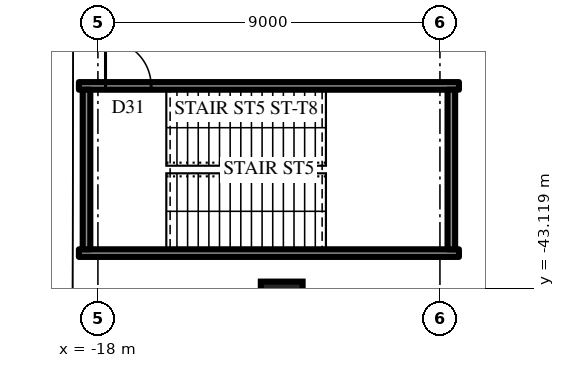
"""IFC4 building model, lengths in metres.
Left out: names, types, materials, properties, quantities, classifications, styles, units other than length and angle.
Written with IfcOpenShell. Run it as: python <this file> out.ifc"""

import sys

from ifc_helpers import new_model, si_unit, direction, frame, frame_2d, origin, origin_2d, place, context, subcontext, project, spatial, rectangle, extrude, element, fill, save


model = new_model("IFC4")
c1 = context("Model", 3, precision=1e-05, world=origin(), true_north=direction((0.0, 1.0)))
c2 = subcontext(c1, "Body", "Model", "MODEL_VIEW")
j1 = project(units=[si_unit("LENGTHUNIT", "METRE"), si_unit("PLANEANGLEUNIT", "RADIAN")], contexts=[c1])
p1 = place(None, origin())
s1 = spatial("IfcSite", under=j1, at=p1, CompositionType="ELEMENT")
p2 = place(p1, origin())
s2 = spatial("IfcBuilding", under=s1, at=p2, CompositionType="ELEMENT")
p3 = place(p2, frame((0.0, 0.0, 13.0)))
s3 = spatial("IfcBuildingStorey", under=s2, at=p3, CompositionType="ELEMENT", Elevation=13.0)
p4 = place(p3, frame((-18.5, -42.2, 0.0), z_axis=(0.0, 0.0, 1.0), x_axis=(1.0, 0.0, 0.0)))
e1 = element("IfcWall", 1, at=p4, inside=s3, PredefinedType="SHEAR", context=c2, shape_type="SweptSolid", body=[
    extrude(rectangle(XDim=10.0, YDim=0.2, at=frame_2d((5.0, 0.0))), origin(), (0.0, 0.0, 1.0), 5.5),
])
p5 = place(p3, frame((-8.5, -37.8, 0.0), z_axis=(0.0, 0.0, 1.0), x_axis=(-1.0, 0.0, 0.0)))
e2 = element("IfcWall", 2, at=p5, inside=s3, PredefinedType="SHEAR", context=c2, shape_type="SweptSolid", body=[
    extrude(rectangle(XDim=10.0, YDim=0.2, at=frame_2d((5.0, 0.0))), origin(), (0.0, 0.0, 1.0), 5.5),
])
p6 = place(p5, frame((8.1, 0.0, 0.0)))
e3 = element("IfcOpeningElement", 3, at=p6, cuts=e2, PredefinedType="OPENING", context=c2, shape_type="SweptSolid", body=[
    extrude(rectangle(XDim=1.2, YDim=2.2, at=frame_2d((0.6, 1.1))), frame((0.0, 0.11, 0.0), z_axis=(0.0, -1.0, 0.0), x_axis=(1.0, 0.0, 0.0)), (0.0, 0.0, 1.0), 0.22),
])
for number, where, z_axis, x_axis in (
    (4, (-18.3, -37.9, 0.0), (0.0, 0.0, 1.0), (0.0, -1.0, 0.0)),
    (5, (-8.7, -42.1, 0.0), (0.0, 0.0, 1.0), (0.0, 1.0, 0.0)),
):
    element("IfcWall", number, at=place(p3, frame(where, z_axis=z_axis, x_axis=x_axis)), inside=s3, PredefinedType="SHEAR", context=c2, shape_type="SweptSolid", body=[
        extrude(rectangle(XDim=4.2, YDim=0.2, at=frame_2d((2.1, 0.0))), origin(), (0.0, 0.0, 1.0), 5.5),
    ])
p7 = place(p3, frame((-13.164, -43.5, 0.0), z_axis=(0.0, 0.0, 1.0), x_axis=(1.0, 0.0, 0.0)))
e6 = element("IfcColumn", 6, at=p7, inside=s3, PredefinedType="COLUMN", context=c2, shape_type="SweptSolid", body=[
    extrude(rectangle(XDim=1.1, YDim=1.1, at=origin_2d()), origin(), (0.0, 0.0, 1.0), 5.5),
])
p8 = place(p6, frame((1.2, 0.0, 0.0), z_axis=(0.0, 0.0, 1.0), x_axis=(-1.0, 0.0, 0.0)))
e7 = element("IfcDoor", 7, at=p8, inside=s3, OperationType="SINGLE_SWING_RIGHT", PredefinedType="DOOR", context=c2, shape_type="SweptSolid", body=[
    extrude(rectangle(XDim=1.2, YDim=2.2, at=frame_2d((0.6, 1.1))), frame((0.0, 0.025, 0.0), z_axis=(0.0, -1.0, 0.0), x_axis=(1.0, 0.0, 0.0)), (0.0, 0.0, 1.0), 0.05),
])
fill(e3, e7)
save(model, sys.argv[1])
